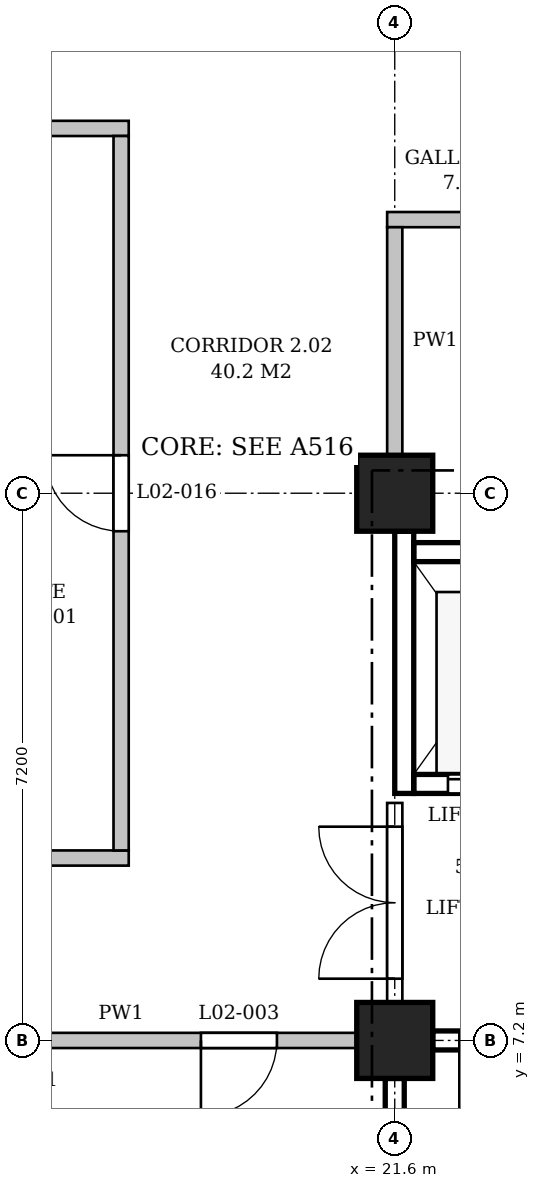
"""IFC4 building model, lengths in metres.
Left out: names, types, materials, properties, quantities, classifications, styles, units other than length and angle.
Written with IfcOpenShell. Run it as: python <this file> out.ifc"""

import sys

from ifc_helpers import new_model, si_unit, direction, frame, frame_2d, origin, origin_2d, place, context, subcontext, project, spatial, polyline, rectangle, outline, extrude, element, fill, save


model = new_model("IFC4")
c1 = context("Model", 3, precision=1e-05, world=origin(), true_north=direction((0.0, 1.0)))
c2 = subcontext(c1, "Body", "Model", "MODEL_VIEW")
j1 = project(units=[si_unit("LENGTHUNIT", "METRE"), si_unit("PLANEANGLEUNIT", "RADIAN")], contexts=[c1])
p1 = place(None, origin())
s1 = spatial("IfcSite", under=j1, at=p1, CompositionType="ELEMENT")
p2 = place(p1, origin())
s2 = spatial("IfcBuilding", under=s1, at=p2, CompositionType="ELEMENT")
p3 = place(p2, frame((0.0, 0.0, 11.4)))
s3 = spatial("IfcBuildingStorey", under=s2, at=p3, CompositionType="ELEMENT", Elevation=11.4)
for number, where, z_axis, x_axis in (
    (1, (21.6, 7.2, 0.0), (0.0, 0.0, 1.0), (1.0, 0.0, 0.0)),
    (2, (21.6, 14.4, 0.0), (0.0, 0.0, 1.0), (1.0, 0.0, 0.0)),
):
    element("IfcColumn", number, at=place(p3, frame(where, z_axis=z_axis, x_axis=x_axis)), inside=s3, PredefinedType="COLUMN", context=c2, shape_type="SweptSolid", body=[
        extrude(rectangle(XDim=1.0, YDim=1.0, at=origin_2d()), origin(), (0.0, 0.0, 1.0), 5.4),
    ])
p4 = place(p3, frame((22.1, 7.2, 0.0), z_axis=(0.0, 0.0, 1.0), x_axis=(1.0, 0.0, 0.0)))
e3 = element("IfcWall", 3, at=p4, inside=s3, PredefinedType="SHEAR", context=c2, shape_type="SweptSolid", body=[
    extrude(rectangle(XDim=6.2, YDim=0.25, at=frame_2d((3.1, 0.0))), origin(), (0.0, 0.0, 1.0), 4.4),
])
p5 = place(p4, frame((0.35, 0.0, 0.0)))
e4 = element("IfcOpeningElement", 4, at=p5, cuts=e3, PredefinedType="OPENING", context=c2, shape_type="SweptSolid", body=[
    extrude(rectangle(XDim=1.1, YDim=2.1, at=frame_2d((0.55, 1.05))), frame((0.0, 0.135, 0.0), z_axis=(0.0, -1.0, 0.0), x_axis=(1.0, 0.0, 0.0)), (0.0, 0.0, 1.0), 0.27),
])
p6 = place(p3, frame((21.6, 0.5, 0.0), z_axis=(0.0, 0.0, 1.0), x_axis=(0.0, 1.0, 0.0)))
e5 = element("IfcWall", 5, at=p6, inside=s3, PredefinedType="SHEAR", context=c2, shape_type="SweptSolid", body=[
    extrude(rectangle(XDim=6.2, YDim=0.25, at=frame_2d((3.1, 0.0))), origin(), (0.0, 0.0, 1.0), 4.4),
])
p7 = place(p3, frame((21.725, 10.45, -0.25), z_axis=(0.0, 0.0, 1.0), x_axis=(0.0, 1.0, 0.0)))
e6 = element("IfcWall", 6, at=p7, inside=s3, PredefinedType="SHEAR", context=c2, shape_type="SweptSolid", body=[
    extrude(rectangle(XDim=3.45, YDim=0.25, at=frame_2d((1.725, 0.0))), origin(), (0.0, 0.0, 1.0), 4.65),
])
p8 = place(p3, frame((21.85, 10.575, -0.25), z_axis=(0.0, 0.0, 1.0), x_axis=(1.0, 0.0, 0.0)))
e7 = element("IfcWall", 7, at=p8, inside=s3, PredefinedType="SHEAR", context=c2, shape_type="SweptSolid", body=[
    extrude(rectangle(XDim=2.0, YDim=0.25, at=frame_2d((1.0, 0.0))), origin(), (0.0, 0.0, 1.0), 5.4),
])
p9 = place(p8, frame((0.45, 0.0, 0.25)))
e8 = element("IfcOpeningElement", 8, at=p9, cuts=e7, PredefinedType="OPENING", context=c2, shape_type="SweptSolid", body=[
    extrude(rectangle(XDim=1.1, YDim=2.1, at=frame_2d((0.55, 1.05))), frame((0.0, 0.135, 0.0), z_axis=(0.0, -1.0, 0.0), x_axis=(1.0, 0.0, 0.0)), (0.0, 0.0, 1.0), 0.27),
])
p10 = place(p3, frame((21.85, 13.625, -0.25), z_axis=(0.0, 0.0, 1.0), x_axis=(1.0, 0.0, 0.0)))
e9 = element("IfcWall", 9, at=p10, inside=s3, PredefinedType="SHEAR", context=c2, shape_type="SweptSolid", body=[
    extrude(rectangle(XDim=2.0, YDim=0.25, at=frame_2d((1.0, 0.0))), origin(), (0.0, 0.0, 1.0), 5.4),
])
p11 = place(p3, frame((14.9, 7.2, 0.0), z_axis=(0.0, 0.0, 1.0), x_axis=(1.0, 0.0, 0.0)))
e10 = element("IfcWall", 10, at=p11, inside=s3, PredefinedType="PARTITIONING", context=c2, shape_type="SweptSolid", body=[
    extrude(rectangle(XDim=6.2, YDim=0.2, at=frame_2d((3.1, 0.0))), origin(), (0.0, 0.0, 1.0), 4.4),
])
p12 = place(p11, frame((4.15, 0.0, 0.0)))
e11 = element("IfcOpeningElement", 11, at=p12, cuts=e10, PredefinedType="OPENING", context=c2, shape_type="SweptSolid", body=[
    extrude(rectangle(XDim=1.0, YDim=2.1, at=frame_2d((0.5, 1.05))), frame((0.0, 0.11, 0.0), z_axis=(0.0, -1.0, 0.0), x_axis=(1.0, 0.0, 0.0)), (0.0, 0.0, 1.0), 0.22),
])
p13 = place(p3, frame((3.5, 9.6, 0.0), z_axis=(0.0, 0.0, 1.0), x_axis=(1.0, 0.0, 0.0)))
e12 = element("IfcWall", 12, at=p13, inside=s3, PredefinedType="PARTITIONING", context=c2, shape_type="SweptSolid", body=[
    extrude(outline(polyline([(0.0, 0.0), (14.6, 0.0), (14.6, 5.15), (11.15, 5.15), (11.15, 4.4), (10.65, 4.4), (10.65, 5.15), (3.95, 5.15), (3.95, 4.4), (3.45, 4.4), (3.45, 5.15), (0.0, 5.15), (0.0, 0.0)])), frame((0.0, 0.1, 0.0), z_axis=(0.0, -1.0, 0.0), x_axis=(1.0, 0.0, 0.0)), (0.0, 0.0, 1.0), 0.2),
])
p14 = place(p13, frame((5.0, 0.0, 0.0)))
e13 = element("IfcOpeningElement", 13, at=p14, cuts=e12, PredefinedType="OPENING", context=c2, shape_type="SweptSolid", body=[
    extrude(rectangle(XDim=1.0, YDim=2.1, at=frame_2d((0.5, 1.05))), frame((0.0, 0.11, 0.0), z_axis=(0.0, -1.0, 0.0), x_axis=(1.0, 0.0, 0.0)), (0.0, 0.0, 1.0), 0.22),
])
p15 = place(p13, frame((8.6, 0.0, 0.0)))
e14 = element("IfcOpeningElement", 14, at=p15, cuts=e12, PredefinedType="OPENING", context=c2, shape_type="SweptSolid", body=[
    extrude(rectangle(XDim=1.0, YDim=2.1, at=frame_2d((0.5, 1.05))), frame((0.0, 0.11, 0.0), z_axis=(0.0, -1.0, 0.0), x_axis=(1.0, 0.0, 0.0)), (0.0, 0.0, 1.0), 0.22),
])
p16 = place(p3, frame((21.5, 18.0, 0.0), z_axis=(0.0, 0.0, 1.0), x_axis=(1.0, 0.0, 0.0)))
e15 = element("IfcWall", 15, at=p16, inside=s3, PredefinedType="PARTITIONING", context=c2, shape_type="SweptSolid", body=[
    extrude(outline(polyline([(0.0, 0.0), (7.15, 0.0), (7.15, 4.55), (7.05, 4.55), (7.05, 5.15), (0.35, 5.15), (0.35, 4.4), (0.0, 4.4), (0.0, 0.0)])), frame((0.0, 0.1, 0.0), z_axis=(0.0, -1.0, 0.0), x_axis=(1.0, 0.0, 0.0)), (0.0, 0.0, 1.0), 0.2),
])
p17 = place(p16, frame((3.125, 0.0, 0.0)))
e16 = element("IfcOpeningElement", 16, at=p17, cuts=e15, PredefinedType="OPENING", context=c2, shape_type="SweptSolid", body=[
    extrude(rectangle(XDim=1.0, YDim=2.1, at=frame_2d((0.5, 1.05))), frame((0.0, 0.11, 0.0), z_axis=(0.0, -1.0, 0.0), x_axis=(1.0, 0.0, 0.0)), (0.0, 0.0, 1.0), 0.22),
])
p18 = place(p3, frame((3.5, 19.2, 0.0), z_axis=(0.0, 0.0, 1.0), x_axis=(1.0, 0.0, 0.0)))
e17 = element("IfcWall", 17, at=p18, inside=s3, PredefinedType="PARTITIONING", context=c2, shape_type="SweptSolid", body=[
    extrude(outline(polyline([(0.0, 0.0), (14.6, 0.0), (14.6, 5.15), (11.15, 5.15), (11.15, 4.4), (10.65, 4.4), (10.65, 5.15), (3.95, 5.15), (3.95, 4.4), (3.45, 4.4), (3.45, 5.15), (0.0, 5.15), (0.0, 0.0)])), frame((0.0, 0.1, 0.0), z_axis=(0.0, -1.0, 0.0), x_axis=(1.0, 0.0, 0.0)), (0.0, 0.0, 1.0), 0.2),
])
p19 = place(p3, frame((18.0, 9.7, 0.0), z_axis=(0.0, 0.0, 1.0), x_axis=(0.0, 1.0, 0.0)))
e18 = element("IfcWall", 18, at=p19, inside=s3, PredefinedType="PARTITIONING", context=c2, shape_type="SweptSolid", body=[
    extrude(outline(polyline([(0.0, 0.0), (9.4, 0.0), (9.4, 5.15), (4.95, 5.15), (4.95, 4.4), (4.45, 4.4), (4.45, 5.15), (0.0, 5.15), (0.0, 0.0)])), frame((0.0, 0.1, 0.0), z_axis=(0.0, -1.0, 0.0), x_axis=(1.0, 0.0, 0.0)), (0.0, 0.0, 1.0), 0.2),
])
p20 = place(p19, frame((4.2, 0.0, 0.0)))
e19 = element("IfcOpeningElement", 19, at=p20, cuts=e18, PredefinedType="OPENING", context=c2, shape_type="SweptSolid", body=[
    extrude(rectangle(XDim=1.0, YDim=2.1, at=frame_2d((0.5, 1.05))), frame((0.0, 0.11, 0.0), z_axis=(0.0, -1.0, 0.0), x_axis=(1.0, 0.0, 0.0)), (0.0, 0.0, 1.0), 0.22),
])
p21 = place(p3, frame((21.6, 7.7, 0.0), z_axis=(0.0, 0.0, 1.0), x_axis=(0.0, 1.0, 0.0)))
e20 = element("IfcWall", 20, at=p21, inside=s3, PredefinedType="PARTITIONING", context=c2, shape_type="SweptSolid", body=[
    extrude(rectangle(XDim=2.625, YDim=0.2, at=frame_2d((1.312, 0.0))), origin(), (0.0, 0.0, 1.0), 4.4),
])
p22 = place(p21, frame((0.312, 0.0, 0.0)))
e21 = element("IfcOpeningElement", 21, at=p22, cuts=e20, PredefinedType="OPENING", context=c2, shape_type="SweptSolid", body=[
    extrude(rectangle(XDim=2.0, YDim=2.4, at=frame_2d((1.0, 1.2))), frame((0.0, 0.11, 0.0), z_axis=(0.0, -1.0, 0.0), x_axis=(1.0, 0.0, 0.0)), (0.0, 0.0, 1.0), 0.22),
])
p23 = place(p3, frame((21.6, 14.9, 0.0), z_axis=(0.0, 0.0, 1.0), x_axis=(0.0, 1.0, 0.0)))
e22 = element("IfcWall", 22, at=p23, inside=s3, PredefinedType="PARTITIONING", context=c2, shape_type="SweptSolid", body=[
    extrude(rectangle(XDim=3.0, YDim=0.2, at=frame_2d((1.5, 0.0))), origin(), (0.0, 0.0, 1.0), 4.4),
])
p24 = place(p5, frame((1.1, 0.0, 0.0), z_axis=(0.0, 0.0, 1.0), x_axis=(-1.0, 0.0, 0.0)))
e23 = element("IfcDoor", 23, at=p24, inside=s3, OperationType="SINGLE_SWING_RIGHT", PredefinedType="DOOR", context=c2, shape_type="SweptSolid", body=[
    extrude(rectangle(XDim=1.1, YDim=2.1, at=frame_2d((0.55, 1.05))), frame((0.0, 0.025, 0.0), z_axis=(0.0, -1.0, 0.0), x_axis=(1.0, 0.0, 0.0)), (0.0, 0.0, 1.0), 0.05),
])
fill(e4, e23)
p25 = place(p9, origin())
e24 = element("IfcDoor", 24, at=p25, inside=s3, OperationType="SLIDING_TO_LEFT", PredefinedType="DOOR", context=c2, shape_type="SweptSolid", body=[
    extrude(rectangle(XDim=1.1, YDim=2.1, at=frame_2d((0.55, 1.05))), frame((0.0, 0.025, 0.0), z_axis=(0.0, -1.0, 0.0), x_axis=(1.0, 0.0, 0.0)), (0.0, 0.0, 1.0), 0.05),
])
fill(e8, e24)
p26 = place(p22, origin())
e25 = element("IfcDoor", 25, at=p26, inside=s3, OperationType="DOUBLE_DOOR_SINGLE_SWING", PredefinedType="DOOR", context=c2, shape_type="SweptSolid", body=[
    extrude(rectangle(XDim=2.0, YDim=2.4, at=frame_2d((1.0, 1.2))), frame((0.0, 0.025, 0.0), z_axis=(0.0, -1.0, 0.0), x_axis=(1.0, 0.0, 0.0)), (0.0, 0.0, 1.0), 0.05),
])
fill(e21, e25)
p27 = place(p12, frame((1.0, 0.0, 0.0), z_axis=(0.0, 0.0, 1.0), x_axis=(-1.0, 0.0, 0.0)))
e26 = element("IfcDoor", 26, at=p27, inside=s3, OperationType="SINGLE_SWING_RIGHT", PredefinedType="DOOR", context=c2, shape_type="SweptSolid", body=[
    extrude(rectangle(XDim=1.0, YDim=2.1, at=frame_2d((0.5, 1.05))), frame((0.0, 0.025, 0.0), z_axis=(0.0, -1.0, 0.0), x_axis=(1.0, 0.0, 0.0)), (0.0, 0.0, 1.0), 0.05),
])
fill(e11, e26)
p28 = place(p20, origin())
e27 = element("IfcDoor", 27, at=p28, inside=s3, OperationType="SINGLE_SWING_RIGHT", PredefinedType="DOOR", context=c2, shape_type="SweptSolid", body=[
    extrude(rectangle(XDim=1.0, YDim=2.1, at=frame_2d((0.5, 1.05))), frame((0.0, 0.025, 0.0), z_axis=(0.0, -1.0, 0.0), x_axis=(1.0, 0.0, 0.0)), (0.0, 0.0, 1.0), 0.05),
])
fill(e19, e27)
save(model, sys.argv[1])
